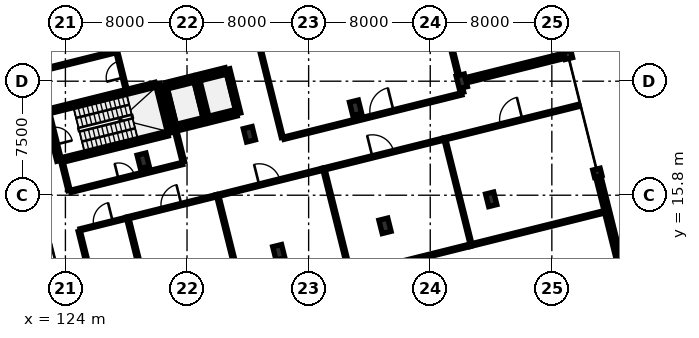
"""IFC4 building model, lengths in metres.
Left out: names, types, materials, properties, quantities, classifications, styles, units other than length and angle.
Written with IfcOpenShell. Run it as: python <this file> out.ifc"""

import sys

from ifc_helpers import new_model, si_unit, direction, frame, frame_2d, origin, origin_2d, place, context, subcontext, project, spatial, rectangle, extrude, element, fill, save


model = new_model("IFC4")
c1 = context("Model", 3, precision=1e-05, world=origin(), true_north=direction((0.0, 1.0)))
c2 = subcontext(c1, "Body", "Model", "MODEL_VIEW")
j1 = project(units=[si_unit("LENGTHUNIT", "METRE"), si_unit("PLANEANGLEUNIT", "RADIAN")], contexts=[c1])
p1 = place(None, origin())
s1 = spatial("IfcSite", under=j1, at=p1, CompositionType="ELEMENT")
p2 = place(p1, origin())
s2 = spatial("IfcBuilding", under=s1, at=p2, CompositionType="ELEMENT")
p3 = place(p2, frame((0.0, 0.0, 5.0)))
s3 = spatial("IfcBuildingStorey", under=s2, at=p3, CompositionType="ELEMENT", Elevation=5.0)
for number, where, z_axis, x_axis in (
    (1, (129.115, 18.067, 0.0), (0.0, 0.0, 1.0), (0.97, 0.242, 0.0)),
    (2, (138.037, 12.046, 0.0), (0.0, 0.0, 1.0), (0.97, 0.242, 0.0)),
    (3, (136.102, 19.808, 0.0), (0.0, 0.0, 1.0), (0.97, 0.242, 0.0)),
    (4, (145.023, 13.788, 0.0), (0.0, 0.0, 1.0), (0.97, 0.242, 0.0)),
    (5, (143.088, 21.55, 0.0), (0.0, 0.0, 1.0), (0.97, 0.242, 0.0)),
):
    element("IfcColumn", number, at=place(p3, frame(where, z_axis=z_axis, x_axis=x_axis)), inside=s3, PredefinedType="COLUMN", context=c2, shape_type="SweptSolid", body=[
        extrude(rectangle(XDim=0.6, YDim=0.9, at=origin_2d()), origin(), (0.0, 0.0, 1.0), 4.2),
    ])
for number, where, z_axis, x_axis in (
    (6, (152.009, 15.53, 0.0), (0.0, 0.0, 1.0), (0.97, 0.242, 0.0)),
    (7, (150.074, 23.292, 0.0), (0.0, 0.0, 1.0), (0.97, 0.242, 0.0)),
):
    element("IfcColumn", number, at=place(p3, frame(where, z_axis=z_axis, x_axis=x_axis)), inside=s3, PredefinedType="COLUMN", context=c2, shape_type="SweptSolid", body=[
        extrude(rectangle(XDim=0.55, YDim=0.85, at=origin_2d()), origin(), (0.0, 0.0, 1.0), 4.2),
    ])
for number, where, z_axis, x_axis in (
    (8, (158.995, 17.271, 0.0), (0.0, 0.0, 1.0), (0.97, 0.242, 0.0)),
    (9, (157.06, 25.034, 0.0), (0.0, 0.0, 1.0), (0.97, 0.242, 0.0)),
):
    element("IfcColumn", number, at=place(p3, frame(where, z_axis=z_axis, x_axis=x_axis)), inside=s3, PredefinedType="COLUMN", context=c2, shape_type="SweptSolid", body=[
        extrude(rectangle(XDim=0.5, YDim=0.5, at=origin_2d()), origin(), (0.0, 0.0, 1.0), 5.596),
    ])
p4 = place(p3, frame((150.341, 23.359, 0.0), z_axis=(0.0, 0.0, 1.0), x_axis=(0.970299354279, 0.241907344009, 0.0)))
e10 = element("IfcWall", 10, at=p4, inside=s3, PredefinedType="SOLIDWALL", context=c2, shape_type="SweptSolid", body=[
    extrude(rectangle(XDim=6.675, YDim=0.35, at=frame_2d((3.337, 0.0))), origin(), (0.0, 0.0, 1.0), 3.485),
])
p5 = place(p4, frame((2.712, 0.0, 0.9)))
e11 = element("IfcOpeningElement", 11, at=p5, cuts=e10, PredefinedType="OPENING", context=c2, shape_type="SweptSolid", body=[
    extrude(rectangle(XDim=1.25, YDim=1.5, at=frame_2d((0.625, 0.75))), frame((0.0, 0.187, 0.0), z_axis=(0.0, -1.0, 0.0), x_axis=(1.0, 0.0, 0.0)), (0.0, 0.0, 1.0), 0.374),
])
p6 = place(p3, frame((159.056, 17.029, 0.0), z_axis=(0.0, 0.0, 1.0), x_axis=(0.241922842305, -0.970295490235, 0.0)))
e12 = element("IfcWall", 12, at=p6, inside=s3, PredefinedType="SOLIDWALL", context=c2, shape_type="SweptSolid", body=[
    extrude(rectangle(XDim=7.5, YDim=0.35, at=frame_2d((3.75, 0.0))), origin(), (0.0, 0.0, 1.0), 4.17),
])
p7 = place(p3, frame((123.75, 18.11, 0.0), z_axis=(0.0, 0.0, 1.0), x_axis=(0.970294108333, 0.241928384724, 0.0)))
e13 = element("IfcWall", 13, at=p7, inside=s3, PredefinedType="SHEAR", context=c2, shape_type="SweptSolid", body=[
    extrude(rectangle(XDim=7.19, YDim=0.32, at=frame_2d((3.595, 0.0))), origin(), (0.0, 0.0, 1.0), 4.2),
])
p8 = place(p3, frame((130.887, 19.889, 0.0), z_axis=(0.0, 0.0, 1.0), x_axis=(-0.241947258837, 0.970289402158, 0.0)))
e14 = element("IfcWall", 14, at=p8, inside=s3, PredefinedType="SHEAR", context=c2, shape_type="SweptSolid", body=[
    extrude(rectangle(XDim=3.32, YDim=0.32, at=frame_2d((1.66, 0.0))), origin(), (0.0, 0.0, 1.0), 4.2),
])
p9 = place(p3, frame((129.924, 23.071, 0.0), z_axis=(0.0, 0.0, 1.0), x_axis=(-0.970294108333, -0.241928384724, 0.0)))
e15 = element("IfcWall", 15, at=p9, inside=s3, PredefinedType="SHEAR", context=c2, shape_type="SweptSolid", body=[
    extrude(rectangle(XDim=7.19, YDim=0.32, at=frame_2d((3.595, 0.0))), origin(), (0.0, 0.0, 1.0), 4.2),
])
p10 = place(p3, frame((122.787, 21.292, 0.0), z_axis=(0.0, 0.0, 1.0), x_axis=(0.241860763027, -0.970310966293, 0.0)))
e16 = element("IfcWall", 16, at=p10, inside=s3, PredefinedType="SHEAR", context=c2, shape_type="SweptSolid", body=[
    extrude(rectangle(XDim=3.32, YDim=0.32, at=frame_2d((1.66, 0.0))), origin(), (0.0, 0.0, 1.0), 4.2),
])
p11 = place(p10, frame((1.085, 0.0, 0.0)))
e17 = element("IfcOpeningElement", 17, at=p11, cuts=e16, PredefinedType="OPENING", context=c2, shape_type="SweptSolid", body=[
    extrude(rectangle(XDim=1.15, YDim=2.15, at=frame_2d((0.575, 1.075))), frame((0.0, 0.172, 0.0), z_axis=(0.0, -1.0, 0.0), x_axis=(1.0, 0.0, 0.0)), (0.0, 0.0, 1.0), 0.344),
])
p12 = place(p3, frame((131.363, 20.176, 0.0), z_axis=(0.0, 0.0, 1.0), x_axis=(0.970284587517, 0.241966566341, 0.0)))
e18 = element("IfcWall", 18, at=p12, inside=s3, PredefinedType="SHEAR", context=c2, shape_type="SweptSolid", body=[
    extrude(rectangle(XDim=1.817, YDim=0.28, at=frame_2d((0.909, 0.0))), origin(), (0.0, 0.0, 1.0), 4.2),
])
p13 = place(p3, frame((133.267, 20.651, 0.0), z_axis=(0.0, 0.0, 1.0), x_axis=(-0.241921647353, 0.970295788171, 0.0)))
e19 = element("IfcWall", 19, at=p13, inside=s3, PredefinedType="SHEAR", context=c2, shape_type="SweptSolid", body=[
    extrude(rectangle(XDim=2.994, YDim=0.28, at=frame_2d((1.497, 0.0))), origin(), (0.0, 0.0, 1.0), 4.2),
])
p14 = place(p3, frame((132.402, 23.521, 0.0), z_axis=(0.0, 0.0, 1.0), x_axis=(-0.970284587517, -0.241966566341, 0.0)))
e20 = element("IfcWall", 20, at=p14, inside=s3, PredefinedType="SHEAR", context=c2, shape_type="SweptSolid", body=[
    extrude(rectangle(XDim=1.817, YDim=0.28, at=frame_2d((0.909, 0.0))), origin(), (0.0, 0.0, 1.0), 4.2),
])
p15 = place(p14, frame((0.259, 0.0, 0.0)))
e21 = element("IfcOpeningElement", 21, at=p15, cuts=e20, PredefinedType="OPENING", context=c2, shape_type="SweptSolid", body=[
    extrude(rectangle(XDim=1.3, YDim=2.2, at=frame_2d((0.65, 1.1))), frame((0.0, 0.152, 0.0), z_axis=(0.0, -1.0, 0.0), x_axis=(1.0, 0.0, 0.0)), (0.0, 0.0, 1.0), 0.304),
])
p16 = place(p3, frame((130.498, 23.046, 0.0), z_axis=(0.0, 0.0, 1.0), x_axis=(0.241921647353, -0.970295788171, 0.0)))
e22 = element("IfcWall", 22, at=p16, inside=s3, PredefinedType="SHEAR", context=c2, shape_type="SweptSolid", body=[
    extrude(rectangle(XDim=2.994, YDim=0.28, at=frame_2d((1.497, 0.0))), origin(), (0.0, 0.0, 1.0), 4.2),
])
p17 = place(p3, frame((133.408, 20.686, 0.0), z_axis=(0.0, 0.0, 1.0), x_axis=(0.970285190026, 0.241964150272, 0.0)))
e23 = element("IfcWall", 23, at=p17, inside=s3, PredefinedType="SHEAR", context=c2, shape_type="SweptSolid", body=[
    extrude(rectangle(XDim=1.91, YDim=0.28, at=frame_2d((0.955, 0.0))), origin(), (0.0, 0.0, 1.0), 4.2),
])
p18 = place(p3, frame((135.402, 21.183, 0.0), z_axis=(0.0, 0.0, 1.0), x_axis=(-0.241921647353, 0.970295788171, 0.0)))
e24 = element("IfcWall", 24, at=p18, inside=s3, PredefinedType="SHEAR", context=c2, shape_type="SweptSolid", body=[
    extrude(rectangle(XDim=2.994, YDim=0.28, at=frame_2d((1.497, 0.0))), origin(), (0.0, 0.0, 1.0), 4.2),
])
p19 = place(p3, frame((134.537, 24.053, 0.0), z_axis=(0.0, 0.0, 1.0), x_axis=(-0.970285190026, -0.241964150272, 0.0)))
e25 = element("IfcWall", 25, at=p19, inside=s3, PredefinedType="SHEAR", context=c2, shape_type="SweptSolid", body=[
    extrude(rectangle(XDim=1.91, YDim=0.28, at=frame_2d((0.955, 0.0))), origin(), (0.0, 0.0, 1.0), 4.2),
])
p20 = place(p19, frame((0.305, 0.0, 0.0)))
e26 = element("IfcOpeningElement", 26, at=p20, cuts=e25, PredefinedType="OPENING", context=c2, shape_type="SweptSolid", body=[
    extrude(rectangle(XDim=1.3, YDim=2.2, at=frame_2d((0.65, 1.1))), frame((0.0, 0.152, 0.0), z_axis=(0.0, -1.0, 0.0), x_axis=(1.0, 0.0, 0.0)), (0.0, 0.0, 1.0), 0.304),
])
p21 = place(p3, frame((124.346, 16.053, 0.0), z_axis=(0.0, 0.0, 1.0), x_axis=(0.970295772287, 0.241921711059, 0.0)))
e27 = element("IfcWall", 27, at=p21, inside=s3, PredefinedType="PARTITIONING", context=c2, shape_type="SweptSolid", body=[
    extrude(rectangle(XDim=7.58, YDim=0.15, at=frame_2d((3.79, 0.0))), origin(), (0.0, 0.0, 1.0), 3.385),
])
p22 = place(p21, frame((3.25, 0.0, 0.0)))
e28 = element("IfcOpeningElement", 28, at=p22, cuts=e27, PredefinedType="OPENING", context=c2, shape_type="SweptSolid", body=[
    extrude(rectangle(XDim=1.08, YDim=2.18, at=frame_2d((0.54, 1.09))), frame((0.0, 0.087, 0.0), z_axis=(0.0, -1.0, 0.0), x_axis=(1.0, 0.0, 0.0)), (0.0, 0.0, 1.0), 0.174),
])
p23 = place(p3, frame((127.995, 22.767, 0.0), z_axis=(0.0, 0.0, 1.0), x_axis=(-0.241877500256, 0.9703067942, 0.0)))
e29 = element("IfcWall", 29, at=p23, inside=s3, PredefinedType="PARTITIONING", context=c2, shape_type="SweptSolid", body=[
    extrude(rectangle(XDim=2.706, YDim=0.125, at=frame_2d((1.353, 0.0))), origin(), (0.0, 0.0, 1.0), 4.2),
])
p24 = place(p23, frame((0.793, 0.0, 0.0)))
e30 = element("IfcOpeningElement", 30, at=p24, cuts=e29, PredefinedType="OPENING", context=c2, shape_type="SweptSolid", body=[
    extrude(rectangle(XDim=1.12, YDim=2.2, at=frame_2d((0.56, 1.1))), frame((0.0, 0.074, 0.0), z_axis=(0.0, -1.0, 0.0), x_axis=(1.0, 0.0, 0.0)), (0.0, 0.0, 1.0), 0.149),
])
p25 = place(p3, frame((124.975, 13.53, 0.0), z_axis=(0.0, 0.0, 1.0), x_axis=(0.970289141252, 0.241948305158, 0.0)))
e31 = element("IfcWall", 31, at=p25, inside=s3, PredefinedType="PARTITIONING", context=c2, shape_type="SweptSolid", body=[
    extrude(rectangle(XDim=3.13, YDim=0.125, at=frame_2d((1.565, 0.0))), origin(), (0.0, 0.0, 1.0), 4.2),
])
p26 = place(p25, frame((0.925, 0.0, 0.0)))
e32 = element("IfcOpeningElement", 32, at=p26, cuts=e31, PredefinedType="OPENING", context=c2, shape_type="SweptSolid", body=[
    extrude(rectangle(XDim=1.28, YDim=2.22, at=frame_2d((0.64, 1.11))), frame((0.0, 0.074, 0.0), z_axis=(0.0, -1.0, 0.0), x_axis=(1.0, 0.0, 0.0)), (0.0, 0.0, 1.0), 0.149),
])
p27 = place(p3, frame((128.023, 14.29, 0.0), z_axis=(0.0, 0.0, 1.0), x_axis=(0.970293282145, 0.241931698263, 0.0)))
e33 = element("IfcWall", 33, at=p27, inside=s3, PredefinedType="PARTITIONING", context=c2, shape_type="SweptSolid", body=[
    extrude(rectangle(XDim=6.088, YDim=0.15, at=frame_2d((3.044, 0.0))), origin(), (0.0, 0.0, 1.0), 3.385),
])
p28 = place(p27, frame((2.374, 0.0, 0.0)))
e34 = element("IfcOpeningElement", 34, at=p28, cuts=e33, PredefinedType="OPENING", context=c2, shape_type="SweptSolid", body=[
    extrude(rectangle(XDim=1.34, YDim=2.24, at=frame_2d((0.67, 1.12))), frame((0.0, 0.087, 0.0), z_axis=(0.0, -1.0, 0.0), x_axis=(1.0, 0.0, 0.0)), (0.0, 0.0, 1.0), 0.174),
])
p29 = place(p3, frame((133.942, 15.766, 0.0), z_axis=(0.0, 0.0, 1.0), x_axis=(0.970292162734, 0.241936187739, 0.0)))
e35 = element("IfcWall", 35, at=p29, inside=s3, PredefinedType="PARTITIONING", context=c2, shape_type="SweptSolid", body=[
    extrude(rectangle(XDim=7.188, YDim=0.15, at=frame_2d((3.594, 0.0))), origin(), (0.0, 0.0, 1.0), 3.385),
])
p30 = place(p29, frame((2.894, 0.0, 0.0)))
e36 = element("IfcOpeningElement", 36, at=p30, cuts=e35, PredefinedType="OPENING", context=c2, shape_type="SweptSolid", body=[
    extrude(rectangle(XDim=1.4, YDim=2.25, at=frame_2d((0.7, 1.125))), frame((0.0, 0.087, 0.0), z_axis=(0.0, -1.0, 0.0), x_axis=(1.0, 0.0, 0.0)), (0.0, 0.0, 1.0), 0.174),
])
p31 = place(p3, frame((140.928, 17.508, 0.0), z_axis=(0.0, 0.0, 1.0), x_axis=(0.970293149657, 0.241932229621, 0.0)))
e37 = element("IfcWall", 37, at=p31, inside=s3, PredefinedType="PARTITIONING", context=c2, shape_type="SweptSolid", body=[
    extrude(rectangle(XDim=8.188, YDim=0.15, at=frame_2d((4.094, 0.0))), origin(), (0.0, 0.0, 1.0), 3.385),
])
p32 = place(p31, frame((3.369, 0.0, 0.0)))
e38 = element("IfcOpeningElement", 38, at=p32, cuts=e37, PredefinedType="OPENING", context=c2, shape_type="SweptSolid", body=[
    extrude(rectangle(XDim=1.45, YDim=2.26, at=frame_2d((0.725, 1.13))), frame((0.0, 0.087, 0.0), z_axis=(0.0, -1.0, 0.0), x_axis=(1.0, 0.0, 0.0)), (0.0, 0.0, 1.0), 0.174),
])
p33 = place(p3, frame((148.885, 19.491, 0.0), z_axis=(0.0, 0.0, 1.0), x_axis=(0.970294203895, 0.241928001454, 0.0)))
e39 = element("IfcWall", 39, at=p33, inside=s3, PredefinedType="PARTITIONING", context=c2, shape_type="SweptSolid", body=[
    extrude(rectangle(XDim=9.171, YDim=0.15, at=frame_2d((4.585, 0.0))), origin(), (0.0, 0.0, 1.0), 3.485),
])
p34 = place(p33, frame((3.835, 0.0, 0.0)))
e40 = element("IfcOpeningElement", 40, at=p34, cuts=e39, PredefinedType="OPENING", context=c2, shape_type="SweptSolid", body=[
    extrude(rectangle(XDim=1.5, YDim=2.28, at=frame_2d((0.75, 1.14))), frame((0.0, 0.087, 0.0), z_axis=(0.0, -1.0, 0.0), x_axis=(1.0, 0.0, 0.0)), (0.0, 0.0, 1.0), 0.174),
])
p35 = place(p3, frame((138.367, 19.549, 0.0), z_axis=(0.0, 0.0, 1.0), x_axis=(0.970292357867, 0.241935405151, 0.0)))
e41 = element("IfcWall", 41, at=p35, inside=s3, PredefinedType="PARTITIONING", context=c2, shape_type="SweptSolid", body=[
    extrude(rectangle(XDim=12.06, YDim=0.15, at=frame_2d((6.03, 0.0))), origin(), (0.0, 0.0, 1.0), 3.385),
])
p36 = place(p35, frame((5.88, 0.0, 0.0)))
e42 = element("IfcOpeningElement", 42, at=p36, cuts=e41, PredefinedType="OPENING", context=c2, shape_type="SweptSolid", body=[
    extrude(rectangle(XDim=1.56, YDim=2.3, at=frame_2d((0.78, 1.15))), frame((0.0, 0.087, 0.0), z_axis=(0.0, -1.0, 0.0), x_axis=(1.0, 0.0, 0.0)), (0.0, 0.0, 1.0), 0.174),
])
p37 = place(p3, frame((124.243, 16.115, 0.0), z_axis=(0.0, 0.0, 1.0), x_axis=(-0.24202255973, 0.970270622343, 0.0)))
e43 = element("IfcWall", 43, at=p37, inside=s3, PredefinedType="PARTITIONING", context=c2, shape_type="SweptSolid", body=[
    extrude(rectangle(XDim=1.792, YDim=0.15, at=frame_2d((0.896, 0.0))), origin(), (0.0, 0.0, 1.0), 3.485),
])
p38 = place(p3, frame((131.763, 17.99, 0.0), z_axis=(0.0, 0.0, 1.0), x_axis=(-0.241962612769, 0.970285573438, 0.0)))
e44 = element("IfcWall", 44, at=p38, inside=s3, PredefinedType="PARTITIONING", context=c2, shape_type="SweptSolid", body=[
    extrude(rectangle(XDim=2.206, YDim=0.16, at=frame_2d((1.103, 0.0))), origin(), (0.0, 0.0, 1.0), 3.485),
])
p39 = place(p3, frame((120.521, 23.55, 0.0), z_axis=(0.0, 0.0, 1.0), x_axis=(0.970294380964, 0.241927291286, 0.0)))
e45 = element("IfcWall", 45, at=p39, inside=s3, PredefinedType="PARTITIONING", context=c2, shape_type="SweptSolid", body=[
    extrude(rectangle(XDim=6.988, YDim=0.15, at=frame_2d((3.494, 0.0))), origin(), (0.0, 0.0, 1.0), 3.485),
])
p40 = place(p3, frame((126.58, 6.74, 0.0), z_axis=(0.0, 0.0, 1.0), x_axis=(-0.24192707633, 0.97029443456, 0.0)))
e46 = element("IfcWall", 46, at=p40, inside=s3, PredefinedType="PARTITIONING", context=c2, shape_type="SweptSolid", body=[
    extrude(rectangle(XDim=6.892, YDim=0.15, at=frame_2d((3.446, 0.0))), origin(), (0.0, 0.0, 1.0), 3.485),
])
p41 = place(p3, frame((129.804, 7.45, 0.0), z_axis=(0.0, 0.0, 1.0), x_axis=(-0.241910170124, 0.97029864969, 0.0)))
e47 = element("IfcWall", 47, at=p41, inside=s3, PredefinedType="PARTITIONING", context=c2, shape_type="SweptSolid", body=[
    extrude(rectangle(XDim=6.981, YDim=0.16, at=frame_2d((3.49, 0.0))), origin(), (0.0, 0.0, 1.0), 3.485),
])
p42 = place(p3, frame((135.733, 8.887, 0.0), z_axis=(0.0, 0.0, 1.0), x_axis=(-0.241913757308, 0.970297755344, 0.0)))
e48 = element("IfcWall", 48, at=p42, inside=s3, PredefinedType="PARTITIONING", context=c2, shape_type="SweptSolid", body=[
    extrude(rectangle(XDim=7.021, YDim=0.15, at=frame_2d((3.51, 0.0))), origin(), (0.0, 0.0, 1.0), 3.485),
])
p43 = place(p3, frame((142.72, 10.622, 0.0), z_axis=(0.0, 0.0, 1.0), x_axis=(-0.241914380839, 0.970297599885, 0.0)))
e49 = element("IfcWall", 49, at=p43, inside=s3, PredefinedType="PARTITIONING", context=c2, shape_type="SweptSolid", body=[
    extrude(rectangle(XDim=7.028, YDim=0.15, at=frame_2d((3.514, 0.0))), origin(), (0.0, 0.0, 1.0), 3.485),
])
p44 = place(p3, frame((142.67, 10.522, 0.0), z_axis=(0.0, 0.0, 1.0), x_axis=(0.970298403727, 0.241911156677, 0.0)))
e50 = element("IfcWall", 50, at=p44, inside=s3, PredefinedType="PARTITIONING", context=c2, shape_type="SweptSolid", body=[
    extrude(rectangle(XDim=8.188, YDim=0.16, at=frame_2d((4.094, 0.0))), origin(), (0.0, 0.0, 1.0), 3.385),
])
p45 = place(p3, frame((150.677, 12.605, 0.0), z_axis=(0.0, 0.0, 1.0), x_axis=(-0.241914380839, 0.970297599885, 0.0)))
e51 = element("IfcWall", 51, at=p45, inside=s3, PredefinedType="PARTITIONING", context=c2, shape_type="SweptSolid", body=[
    extrude(rectangle(XDim=7.028, YDim=0.125, at=frame_2d((3.514, 0.0))), origin(), (0.0, 0.0, 1.0), 3.485),
])
p46 = place(p3, frame((150.627, 12.505, 0.0), z_axis=(0.0, 0.0, 1.0), x_axis=(0.970292468543, 0.241934961279, 0.0)))
e52 = element("IfcWall", 52, at=p46, inside=s3, PredefinedType="PARTITIONING", context=c2, shape_type="SweptSolid", body=[
    extrude(rectangle(XDim=9.086, YDim=0.16, at=frame_2d((4.543, 0.0))), origin(), (0.0, 0.0, 1.0), 3.485),
])
p47 = place(p3, frame((138.264, 19.611, 0.0), z_axis=(0.0, 0.0, 1.0), x_axis=(-0.241920353256, 0.970296110824, 0.0)))
e53 = element("IfcWall", 53, at=p47, inside=s3, PredefinedType="PARTITIONING", context=c2, shape_type="SweptSolid", body=[
    extrude(rectangle(XDim=8.03, YDim=0.125, at=frame_2d((4.015, 0.0))), origin(), (0.0, 0.0, 1.0), 3.485),
])
p48 = place(p3, frame((150.13, 22.569, 0.0), z_axis=(0.0, 0.0, 1.0), x_axis=(-0.241919812841, 0.970296245564, 0.0)))
e54 = element("IfcWall", 54, at=p48, inside=s3, PredefinedType="PARTITIONING", context=c2, shape_type="SweptSolid", body=[
    extrude(rectangle(XDim=8.023, YDim=0.15, at=frame_2d((4.011, 0.0))), origin(), (0.0, 0.0, 1.0), 3.485),
])
p49 = place(p5, origin())
e55 = element("IfcWindow", 55, at=p49, inside=s3, PartitioningType="SINGLE_PANEL", PredefinedType="WINDOW", context=c2, shape_type="SweptSolid", body=[
    extrude(rectangle(XDim=1.25, YDim=1.5, at=frame_2d((0.625, 0.75))), frame((0.0, 0.03, 0.0), z_axis=(0.0, -1.0, 0.0), x_axis=(1.0, 0.0, 0.0)), (0.0, 0.0, 1.0), 0.06),
])
fill(e11, e55)
p50 = place(p11, origin())
e56 = element("IfcDoor", 56, at=p50, inside=s3, OperationType="SINGLE_SWING_RIGHT", PredefinedType="DOOR", context=c2, shape_type="SweptSolid", body=[
    extrude(rectangle(XDim=1.15, YDim=2.15, at=frame_2d((0.575, 1.075))), frame((0.0, 0.025, 0.0), z_axis=(0.0, -1.0, 0.0), x_axis=(1.0, 0.0, 0.0)), (0.0, 0.0, 1.0), 0.05),
])
fill(e17, e56)
p51 = place(p15, origin())
e57 = element("IfcDoor", 57, at=p51, inside=s3, OperationType="SLIDING_TO_LEFT", PredefinedType="DOOR", context=c2, shape_type="SweptSolid", body=[
    extrude(rectangle(XDim=1.3, YDim=2.2, at=frame_2d((0.65, 1.1))), frame((0.0, 0.025, 0.0), z_axis=(0.0, -1.0, 0.0), x_axis=(1.0, 0.0, 0.0)), (0.0, 0.0, 1.0), 0.05),
])
fill(e21, e57)
p52 = place(p20, origin())
e58 = element("IfcDoor", 58, at=p52, inside=s3, OperationType="SLIDING_TO_RIGHT", PredefinedType="DOOR", context=c2, shape_type="SweptSolid", body=[
    extrude(rectangle(XDim=1.3, YDim=2.2, at=frame_2d((0.65, 1.1))), frame((0.0, 0.025, 0.0), z_axis=(0.0, -1.0, 0.0), x_axis=(1.0, 0.0, 0.0)), (0.0, 0.0, 1.0), 0.05),
])
fill(e26, e58)
p53 = place(p22, origin())
e59 = element("IfcDoor", 59, at=p53, inside=s3, OperationType="SINGLE_SWING_LEFT", PredefinedType="DOOR", context=c2, shape_type="SweptSolid", body=[
    extrude(rectangle(XDim=1.08, YDim=2.18, at=frame_2d((0.54, 1.09))), frame((0.0, 0.025, 0.0), z_axis=(0.0, -1.0, 0.0), x_axis=(1.0, 0.0, 0.0)), (0.0, 0.0, 1.0), 0.05),
])
fill(e28, e59)
p54 = place(p24, origin())
e60 = element("IfcDoor", 60, at=p54, inside=s3, OperationType="SINGLE_SWING_LEFT", PredefinedType="DOOR", context=c2, shape_type="SweptSolid", body=[
    extrude(rectangle(XDim=1.12, YDim=2.2, at=frame_2d((0.56, 1.1))), frame((0.0, 0.025, 0.0), z_axis=(0.0, -1.0, 0.0), x_axis=(1.0, 0.0, 0.0)), (0.0, 0.0, 1.0), 0.05),
])
fill(e30, e60)
p55 = place(p26, origin())
e61 = element("IfcDoor", 61, at=p55, inside=s3, OperationType="SINGLE_SWING_RIGHT", PredefinedType="DOOR", context=c2, shape_type="SweptSolid", body=[
    extrude(rectangle(XDim=1.28, YDim=2.22, at=frame_2d((0.64, 1.11))), frame((0.0, 0.025, 0.0), z_axis=(0.0, -1.0, 0.0), x_axis=(1.0, 0.0, 0.0)), (0.0, 0.0, 1.0), 0.05),
])
fill(e32, e61)
p56 = place(p28, origin())
e62 = element("IfcDoor", 62, at=p56, inside=s3, OperationType="SINGLE_SWING_RIGHT", PredefinedType="DOOR", context=c2, shape_type="SweptSolid", body=[
    extrude(rectangle(XDim=1.34, YDim=2.24, at=frame_2d((0.67, 1.12))), frame((0.0, 0.025, 0.0), z_axis=(0.0, -1.0, 0.0), x_axis=(1.0, 0.0, 0.0)), (0.0, 0.0, 1.0), 0.05),
])
fill(e34, e62)
p57 = place(p30, origin())
e63 = element("IfcDoor", 63, at=p57, inside=s3, OperationType="SINGLE_SWING_LEFT", PredefinedType="DOOR", context=c2, shape_type="SweptSolid", body=[
    extrude(rectangle(XDim=1.4, YDim=2.25, at=frame_2d((0.7, 1.125))), frame((0.0, 0.025, 0.0), z_axis=(0.0, -1.0, 0.0), x_axis=(1.0, 0.0, 0.0)), (0.0, 0.0, 1.0), 0.05),
])
fill(e36, e63)
p58 = place(p32, origin())
e64 = element("IfcDoor", 64, at=p58, inside=s3, OperationType="SINGLE_SWING_LEFT", PredefinedType="DOOR", context=c2, shape_type="SweptSolid", body=[
    extrude(rectangle(XDim=1.45, YDim=2.26, at=frame_2d((0.725, 1.13))), frame((0.0, 0.025, 0.0), z_axis=(0.0, -1.0, 0.0), x_axis=(1.0, 0.0, 0.0)), (0.0, 0.0, 1.0), 0.05),
])
fill(e38, e64)
p59 = place(p34, origin())
e65 = element("IfcDoor", 65, at=p59, inside=s3, OperationType="SINGLE_SWING_RIGHT", PredefinedType="DOOR", context=c2, shape_type="SweptSolid", body=[
    extrude(rectangle(XDim=1.5, YDim=2.28, at=frame_2d((0.75, 1.14))), frame((0.0, 0.025, 0.0), z_axis=(0.0, -1.0, 0.0), x_axis=(1.0, 0.0, 0.0)), (0.0, 0.0, 1.0), 0.05),
])
fill(e40, e65)
p60 = place(p36, origin())
e66 = element("IfcDoor", 66, at=p60, inside=s3, OperationType="SINGLE_SWING_RIGHT", PredefinedType="DOOR", context=c2, shape_type="SweptSolid", body=[
    extrude(rectangle(XDim=1.56, YDim=2.3, at=frame_2d((0.78, 1.15))), frame((0.0, 0.025, 0.0), z_axis=(0.0, -1.0, 0.0), x_axis=(1.0, 0.0, 0.0)), (0.0, 0.0, 1.0), 0.05),
])
fill(e42, e66)
save(model, sys.argv[1])
